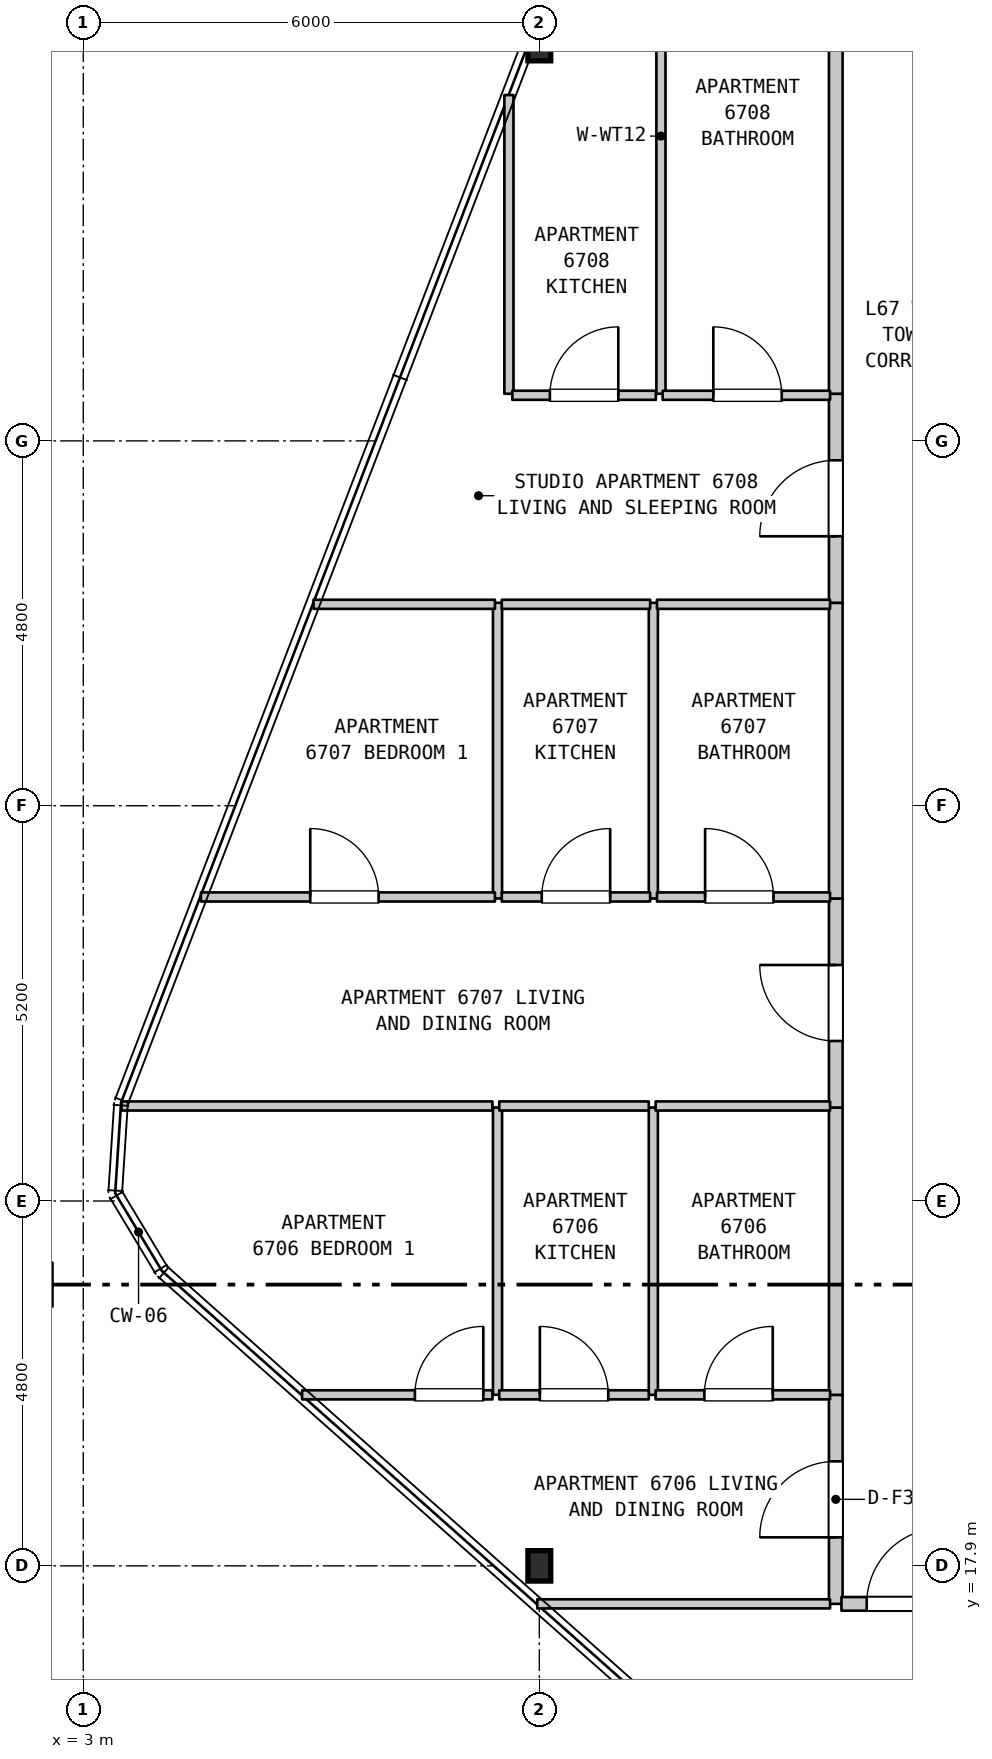
"""IFC4 building model, lengths in metres.
Left out: names, types, materials, properties, quantities, classifications, styles, units other than length and angle.
Written with IfcOpenShell. Run it as: python <this file> out.ifc"""

import sys

from ifc_helpers import new_model, si_unit, direction, frame, frame_2d, origin, origin_2d, place, context, subcontext, project, spatial, rectangle, i_section, extrude, element, fill, save


model = new_model("IFC4")
c1 = context("Model", 3, precision=1e-05, world=origin(), true_north=direction((0.0, 1.0)))
c2 = subcontext(c1, "Body", "Model", "MODEL_VIEW")
j1 = project(units=[si_unit("LENGTHUNIT", "METRE"), si_unit("PLANEANGLEUNIT", "RADIAN")], contexts=[c1])
p1 = place(None, origin())
s1 = spatial("IfcSite", under=j1, at=p1, CompositionType="ELEMENT")
p2 = place(p1, origin())
s2 = spatial("IfcBuilding", under=s1, at=p2, CompositionType="ELEMENT")
p3 = place(p2, frame((0.0, 0.0, 269.5)))
s3 = spatial("IfcBuildingStorey", under=s2, at=p3, CompositionType="ELEMENT", Elevation=269.5)
for number, where, z_axis, x_axis in (
    (1, (9.0, 17.9, 0.0), (0.0, 0.0, 1.0), (1.0, 0.0, 0.0)),
    (2, (9.0, 37.9, 0.0), (0.0, 0.0, 1.0), (1.0, 0.0, 0.0)),
):
    element("IfcColumn", number, at=place(p3, frame(where, z_axis=z_axis, x_axis=x_axis)), inside=s3, PredefinedType="COLUMN", context=c2, shape_type="SweptSolid", body=[
        extrude(i_section(OverallWidth=0.3, OverallDepth=0.4, WebThickness=0.013, FlangeThickness=0.024, FilletRadius=0.027, at=origin_2d()), origin(), (0.0, 0.0, 1.0), 3.7),
    ])
p4 = place(p3, frame((8.45, 20.15, 0.0), z_axis=(0.0, 0.0, 1.0), x_axis=(0.0, 1.0, 0.0)))
e3 = element("IfcWall", 3, at=p4, inside=s3, PredefinedType="PARTITIONING", context=c2, shape_type="SweptSolid", body=[
    extrude(rectangle(XDim=3.78, YDim=0.12, at=frame_2d((1.89, 0.0))), origin(), (0.0, 0.0, 1.0), 3.39),
])
p5 = place(p3, frame((8.45, 26.68, 0.0), z_axis=(0.0, 0.0, 1.0), x_axis=(0.0, 1.0, 0.0)))
e4 = element("IfcWall", 4, at=p5, inside=s3, PredefinedType="PARTITIONING", context=c2, shape_type="SweptSolid", body=[
    extrude(rectangle(XDim=3.89, YDim=0.12, at=frame_2d((1.945, 0.0))), origin(), (0.0, 0.0, 1.0), 3.39),
])
p6 = place(p3, frame((8.6, 33.32, 0.0), z_axis=(0.0, 0.0, 1.0), x_axis=(0.0, 1.0, 0.0)))
e5 = element("IfcWall", 5, at=p6, inside=s3, PredefinedType="PARTITIONING", context=c2, shape_type="SweptSolid", body=[
    extrude(rectangle(XDim=3.93, YDim=0.12, at=frame_2d((1.965, 0.0))), origin(), (0.0, 0.0, 1.0), 3.39),
])
p7 = place(p3, frame((10.5, 20.15, 0.0), z_axis=(0.0, 0.0, 1.0), x_axis=(0.0, 1.0, 0.0)))
e6 = element("IfcWall", 6, at=p7, inside=s3, PredefinedType="PARTITIONING", context=c2, shape_type="SweptSolid", body=[
    extrude(rectangle(XDim=3.78, YDim=0.12, at=frame_2d((1.89, 0.0))), origin(), (0.0, 0.0, 1.0), 3.39),
])
p8 = place(p3, frame((10.5, 26.68, 0.0), z_axis=(0.0, 0.0, 1.0), x_axis=(0.0, 1.0, 0.0)))
e7 = element("IfcWall", 7, at=p8, inside=s3, PredefinedType="PARTITIONING", context=c2, shape_type="SweptSolid", body=[
    extrude(rectangle(XDim=3.89, YDim=0.12, at=frame_2d((1.945, 0.0))), origin(), (0.0, 0.0, 1.0), 3.39),
])
p9 = place(p3, frame((10.6, 33.32, 0.0), z_axis=(0.0, 0.0, 1.0), x_axis=(0.0, 1.0, 0.0)))
e8 = element("IfcWall", 8, at=p9, inside=s3, PredefinedType="PARTITIONING", context=c2, shape_type="SweptSolid", body=[
    extrude(rectangle(XDim=6.78, YDim=0.12, at=frame_2d((3.39, 0.0))), origin(), (0.0, 0.0, 1.0), 3.39),
])
p10 = place(p3, frame((12.9, 17.4, 0.0), z_axis=(0.0, 0.0, 1.0), x_axis=(0.0, 1.0, 0.0)))
e9 = element("IfcWall", 9, at=p10, inside=s3, PredefinedType="STANDARD", context=c2, shape_type="SweptSolid", body=[
    extrude(rectangle(XDim=2.75, YDim=0.18, at=frame_2d((1.375, 0.0))), origin(), (0.0, 0.0, 1.0), 3.39),
])
p11 = place(p10, frame((0.875, 0.0, 0.0)))
e10 = element("IfcOpeningElement", 10, at=p11, cuts=e9, PredefinedType="OPENING", context=c2, shape_type="SweptSolid", body=[
    extrude(rectangle(XDim=1.0, YDim=2.15, at=frame_2d((0.5, 1.075))), frame((0.0, 0.1, 0.0), z_axis=(0.0, -1.0, 0.0), x_axis=(1.0, 0.0, 0.0)), (0.0, 0.0, 1.0), 0.2),
])
p12 = place(p3, frame((12.9, 20.15, 0.0), z_axis=(0.0, 0.0, 1.0), x_axis=(0.0, 1.0, 0.0)))
e11 = element("IfcWall", 11, at=p12, inside=s3, PredefinedType="STANDARD", context=c2, shape_type="SweptSolid", body=[
    extrude(rectangle(XDim=3.78, YDim=0.18, at=frame_2d((1.89, 0.0))), origin(), (0.0, 0.0, 1.0), 3.39),
])
p13 = place(p3, frame((12.9, 23.93, 0.0), z_axis=(0.0, 0.0, 1.0), x_axis=(0.0, 1.0, 0.0)))
e12 = element("IfcWall", 12, at=p13, inside=s3, PredefinedType="STANDARD", context=c2, shape_type="SweptSolid", body=[
    extrude(rectangle(XDim=2.75, YDim=0.18, at=frame_2d((1.375, 0.0))), origin(), (0.0, 0.0, 1.0), 3.39),
])
p14 = place(p13, frame((0.875, 0.0, 0.0)))
e13 = element("IfcOpeningElement", 13, at=p14, cuts=e12, PredefinedType="OPENING", context=c2, shape_type="SweptSolid", body=[
    extrude(rectangle(XDim=1.0, YDim=2.15, at=frame_2d((0.5, 1.075))), frame((0.0, 0.1, 0.0), z_axis=(0.0, -1.0, 0.0), x_axis=(1.0, 0.0, 0.0)), (0.0, 0.0, 1.0), 0.2),
])
p15 = place(p3, frame((12.9, 26.68, 0.0), z_axis=(0.0, 0.0, 1.0), x_axis=(0.0, 1.0, 0.0)))
e14 = element("IfcWall", 14, at=p15, inside=s3, PredefinedType="STANDARD", context=c2, shape_type="SweptSolid", body=[
    extrude(rectangle(XDim=3.89, YDim=0.18, at=frame_2d((1.945, 0.0))), origin(), (0.0, 0.0, 1.0), 3.39),
])
p16 = place(p3, frame((12.9, 30.57, 0.0), z_axis=(0.0, 0.0, 1.0), x_axis=(0.0, 1.0, 0.0)))
e15 = element("IfcWall", 15, at=p16, inside=s3, PredefinedType="STANDARD", context=c2, shape_type="SweptSolid", body=[
    extrude(rectangle(XDim=2.75, YDim=0.18, at=frame_2d((1.375, 0.0))), origin(), (0.0, 0.0, 1.0), 3.39),
])
p17 = place(p16, frame((0.875, 0.0, 0.0)))
e16 = element("IfcOpeningElement", 16, at=p17, cuts=e15, PredefinedType="OPENING", context=c2, shape_type="SweptSolid", body=[
    extrude(rectangle(XDim=1.0, YDim=2.15, at=frame_2d((0.5, 1.075))), frame((0.0, 0.1, 0.0), z_axis=(0.0, -1.0, 0.0), x_axis=(1.0, 0.0, 0.0)), (0.0, 0.0, 1.0), 0.2),
])
p18 = place(p3, frame((12.9, 33.32, 0.0), z_axis=(0.0, 0.0, 1.0), x_axis=(0.0, 1.0, 0.0)))
e17 = element("IfcWall", 17, at=p18, inside=s3, PredefinedType="STANDARD", context=c2, shape_type="SweptSolid", body=[
    extrude(rectangle(XDim=6.78, YDim=0.18, at=frame_2d((3.39, 0.0))), origin(), (0.0, 0.0, 1.0), 3.39),
])
p19 = place(p3, frame((8.973, 17.4, 0.0), z_axis=(0.0, 0.0, 1.0), x_axis=(1.0, 0.0, 0.0)))
e18 = element("IfcWall", 18, at=p19, inside=s3, PredefinedType="PARTITIONING", context=c2, shape_type="SweptSolid", body=[
    extrude(rectangle(XDim=3.852, YDim=0.12, at=frame_2d((1.926, 0.0))), origin(), (0.0, 0.0, 1.0), 3.39),
])
p20 = place(p3, frame((12.975, 17.4, 0.0), z_axis=(0.0, 0.0, 1.0), x_axis=(1.0, 0.0, 0.0)))
e19 = element("IfcWall", 19, at=p20, inside=s3, PredefinedType="STANDARD", context=c2, shape_type="SweptSolid", body=[
    extrude(rectangle(XDim=3.18, YDim=0.18, at=frame_2d((1.59, 0.0))), origin(), (0.0, 0.0, 1.0), 3.39),
])
p21 = place(p20, frame((0.332, 0.0, 0.0)))
e20 = element("IfcOpeningElement", 20, at=p21, cuts=e19, PredefinedType="OPENING", context=c2, shape_type="SweptSolid", body=[
    extrude(rectangle(XDim=1.0, YDim=2.15, at=frame_2d((0.5, 1.075))), frame((0.0, 0.1, 0.0), z_axis=(0.0, -1.0, 0.0), x_axis=(1.0, 0.0, 0.0)), (0.0, 0.0, 1.0), 0.2),
])
p22 = place(p3, frame((5.879, 20.15, 0.0), z_axis=(0.0, 0.0, 1.0), x_axis=(1.0, 0.0, 0.0)))
e21 = element("IfcWall", 21, at=p22, inside=s3, PredefinedType="PARTITIONING", context=c2, shape_type="SweptSolid", body=[
    extrude(rectangle(XDim=2.504, YDim=0.12, at=frame_2d((1.252, 0.0))), origin(), (0.0, 0.0, 1.0), 3.39),
])
p23 = place(p22, frame((1.484, 0.0, 0.0)))
e22 = element("IfcOpeningElement", 22, at=p23, cuts=e21, PredefinedType="OPENING", context=c2, shape_type="SweptSolid", body=[
    extrude(rectangle(XDim=0.9, YDim=2.15, at=frame_2d((0.45, 1.075))), frame((0.0, 0.07, 0.0), z_axis=(0.0, -1.0, 0.0), x_axis=(1.0, 0.0, 0.0)), (0.0, 0.0, 1.0), 0.14),
])
p24 = place(p3, frame((8.473, 20.15, 0.0), z_axis=(0.0, 0.0, 1.0), x_axis=(1.0, 0.0, 0.0)))
e23 = element("IfcWall", 23, at=p24, inside=s3, PredefinedType="PARTITIONING", context=c2, shape_type="SweptSolid", body=[
    extrude(rectangle(XDim=1.967, YDim=0.12, at=frame_2d((0.983, 0.0))), origin(), (0.0, 0.0, 1.0), 3.39),
])
p25 = place(p24, frame((0.534, 0.0, 0.0)))
e24 = element("IfcOpeningElement", 24, at=p25, cuts=e23, PredefinedType="OPENING", context=c2, shape_type="SweptSolid", body=[
    extrude(rectangle(XDim=0.9, YDim=2.15, at=frame_2d((0.45, 1.075))), frame((0.0, 0.07, 0.0), z_axis=(0.0, -1.0, 0.0), x_axis=(1.0, 0.0, 0.0)), (0.0, 0.0, 1.0), 0.14),
])
p26 = place(p3, frame((10.53, 20.15, 0.0), z_axis=(0.0, 0.0, 1.0), x_axis=(1.0, 0.0, 0.0)))
e25 = element("IfcWall", 25, at=p26, inside=s3, PredefinedType="PARTITIONING", context=c2, shape_type="SweptSolid", body=[
    extrude(rectangle(XDim=2.295, YDim=0.12, at=frame_2d((1.147, 0.0))), origin(), (0.0, 0.0, 1.0), 3.39),
])
p27 = place(p26, frame((0.641, 0.0, 0.0)))
e26 = element("IfcOpeningElement", 26, at=p27, cuts=e25, PredefinedType="OPENING", context=c2, shape_type="SweptSolid", body=[
    extrude(rectangle(XDim=0.9, YDim=2.1, at=frame_2d((0.45, 1.05))), frame((0.0, 0.07, 0.0), z_axis=(0.0, -1.0, 0.0), x_axis=(1.0, 0.0, 0.0)), (0.0, 0.0, 1.0), 0.14),
])
p28 = place(p3, frame((3.504, 23.95, 0.0), z_axis=(0.0, 0.0, 1.0), x_axis=(1.0, 0.0, 0.0)))
e27 = element("IfcWall", 27, at=p28, inside=s3, PredefinedType="PARTITIONING", context=c2, shape_type="SweptSolid", body=[
    extrude(rectangle(XDim=4.879, YDim=0.12, at=frame_2d((2.439, 0.0))), origin(), (0.0, 0.0, 1.0), 3.39),
])
p29 = place(p3, frame((8.473, 23.95, 0.0), z_axis=(0.0, 0.0, 1.0), x_axis=(1.0, 0.0, 0.0)))
e28 = element("IfcWall", 28, at=p29, inside=s3, PredefinedType="PARTITIONING", context=c2, shape_type="SweptSolid", body=[
    extrude(rectangle(XDim=1.967, YDim=0.12, at=frame_2d((0.983, 0.0))), origin(), (0.0, 0.0, 1.0), 3.39),
])
p30 = place(p3, frame((10.53, 23.95, 0.0), z_axis=(0.0, 0.0, 1.0), x_axis=(1.0, 0.0, 0.0)))
e29 = element("IfcWall", 29, at=p30, inside=s3, PredefinedType="PARTITIONING", context=c2, shape_type="SweptSolid", body=[
    extrude(rectangle(XDim=2.295, YDim=0.12, at=frame_2d((1.147, 0.0))), origin(), (0.0, 0.0, 1.0), 3.39),
])
p31 = place(p3, frame((4.548, 26.7, 0.0), z_axis=(0.0, 0.0, 1.0), x_axis=(1.0, 0.0, 0.0)))
e30 = element("IfcWall", 30, at=p31, inside=s3, PredefinedType="PARTITIONING", context=c2, shape_type="SweptSolid", body=[
    extrude(rectangle(XDim=3.868, YDim=0.12, at=frame_2d((1.934, 0.0))), origin(), (0.0, 0.0, 1.0), 3.39),
])
p32 = place(p31, frame((1.438, 0.0, 0.0)))
e31 = element("IfcOpeningElement", 31, at=p32, cuts=e30, PredefinedType="OPENING", context=c2, shape_type="SweptSolid", body=[
    extrude(rectangle(XDim=0.9, YDim=2.15, at=frame_2d((0.45, 1.075))), frame((0.0, 0.07, 0.0), z_axis=(0.0, -1.0, 0.0), x_axis=(1.0, 0.0, 0.0)), (0.0, 0.0, 1.0), 0.14),
])
p33 = place(p3, frame((8.506, 26.7, 0.0), z_axis=(0.0, 0.0, 1.0), x_axis=(1.0, 0.0, 0.0)))
e32 = element("IfcWall", 32, at=p33, inside=s3, PredefinedType="PARTITIONING", context=c2, shape_type="SweptSolid", body=[
    extrude(rectangle(XDim=1.952, YDim=0.12, at=frame_2d((0.976, 0.0))), origin(), (0.0, 0.0, 1.0), 3.39),
])
p34 = place(p33, frame((0.526, 0.0, 0.0)))
e33 = element("IfcOpeningElement", 33, at=p34, cuts=e32, PredefinedType="OPENING", context=c2, shape_type="SweptSolid", body=[
    extrude(rectangle(XDim=0.9, YDim=2.15, at=frame_2d((0.45, 1.075))), frame((0.0, 0.07, 0.0), z_axis=(0.0, -1.0, 0.0), x_axis=(1.0, 0.0, 0.0)), (0.0, 0.0, 1.0), 0.14),
])
p35 = place(p3, frame((10.548, 26.7, 0.0), z_axis=(0.0, 0.0, 1.0), x_axis=(1.0, 0.0, 0.0)))
e34 = element("IfcWall", 34, at=p35, inside=s3, PredefinedType="PARTITIONING", context=c2, shape_type="SweptSolid", body=[
    extrude(rectangle(XDim=2.277, YDim=0.12, at=frame_2d((1.138, 0.0))), origin(), (0.0, 0.0, 1.0), 3.39),
])
p36 = place(p35, frame((0.633, 0.0, 0.0)))
e35 = element("IfcOpeningElement", 35, at=p36, cuts=e34, PredefinedType="OPENING", context=c2, shape_type="SweptSolid", body=[
    extrude(rectangle(XDim=0.9, YDim=2.1, at=frame_2d((0.45, 1.05))), frame((0.0, 0.07, 0.0), z_axis=(0.0, -1.0, 0.0), x_axis=(1.0, 0.0, 0.0)), (0.0, 0.0, 1.0), 0.14),
])
p37 = place(p3, frame((6.029, 30.55, 0.0), z_axis=(0.0, 0.0, 1.0), x_axis=(1.0, 0.0, 0.0)))
e36 = element("IfcWall", 36, at=p37, inside=s3, PredefinedType="PARTITIONING", context=c2, shape_type="SweptSolid", body=[
    extrude(rectangle(XDim=2.387, YDim=0.12, at=frame_2d((1.193, 0.0))), origin(), (0.0, 0.0, 1.0), 3.39),
])
p38 = place(p3, frame((8.506, 30.55, 0.0), z_axis=(0.0, 0.0, 1.0), x_axis=(1.0, 0.0, 0.0)))
e37 = element("IfcWall", 37, at=p38, inside=s3, PredefinedType="PARTITIONING", context=c2, shape_type="SweptSolid", body=[
    extrude(rectangle(XDim=1.952, YDim=0.12, at=frame_2d((0.976, 0.0))), origin(), (0.0, 0.0, 1.0), 3.39),
])
p39 = place(p3, frame((10.548, 30.55, 0.0), z_axis=(0.0, 0.0, 1.0), x_axis=(1.0, 0.0, 0.0)))
e38 = element("IfcWall", 38, at=p39, inside=s3, PredefinedType="PARTITIONING", context=c2, shape_type="SweptSolid", body=[
    extrude(rectangle(XDim=2.277, YDim=0.12, at=frame_2d((1.138, 0.0))), origin(), (0.0, 0.0, 1.0), 3.39),
])
p40 = place(p3, frame((8.645, 33.3, 0.0), z_axis=(0.0, 0.0, 1.0), x_axis=(1.0, 0.0, 0.0)))
e39 = element("IfcWall", 39, at=p40, inside=s3, PredefinedType="PARTITIONING", context=c2, shape_type="SweptSolid", body=[
    extrude(rectangle(XDim=1.888, YDim=0.12, at=frame_2d((0.944, 0.0))), origin(), (0.0, 0.0, 1.0), 3.39),
])
p41 = place(p40, frame((0.494, 0.0, 0.0)))
e40 = element("IfcOpeningElement", 40, at=p41, cuts=e39, PredefinedType="OPENING", context=c2, shape_type="SweptSolid", body=[
    extrude(rectangle(XDim=0.9, YDim=2.15, at=frame_2d((0.45, 1.075))), frame((0.0, 0.07, 0.0), z_axis=(0.0, -1.0, 0.0), x_axis=(1.0, 0.0, 0.0)), (0.0, 0.0, 1.0), 0.14),
])
p42 = place(p3, frame((10.623, 33.3, 0.0), z_axis=(0.0, 0.0, 1.0), x_axis=(1.0, 0.0, 0.0)))
e41 = element("IfcWall", 41, at=p42, inside=s3, PredefinedType="PARTITIONING", context=c2, shape_type="SweptSolid", body=[
    extrude(rectangle(XDim=2.202, YDim=0.12, at=frame_2d((1.101, 0.0))), origin(), (0.0, 0.0, 1.0), 3.39),
])
p43 = place(p42, frame((0.666, 0.0, 0.0)))
e42 = element("IfcOpeningElement", 42, at=p43, cuts=e41, PredefinedType="OPENING", context=c2, shape_type="SweptSolid", body=[
    extrude(rectangle(XDim=0.9, YDim=2.1, at=frame_2d((0.45, 1.05))), frame((0.0, 0.07, 0.0), z_axis=(0.0, -1.0, 0.0), x_axis=(1.0, 0.0, 0.0)), (0.0, 0.0, 1.0), 0.14),
])
p44 = place(p11, origin())
e43 = element("IfcDoor", 43, at=p44, inside=s3, OperationType="SINGLE_SWING_LEFT", PredefinedType="DOOR", context=c2, shape_type="SweptSolid", body=[
    extrude(rectangle(XDim=1.0, YDim=2.15, at=frame_2d((0.5, 1.075))), frame((0.0, 0.025, 0.0), z_axis=(0.0, -1.0, 0.0), x_axis=(1.0, 0.0, 0.0)), (0.0, 0.0, 1.0), 0.05),
])
fill(e10, e43)
p45 = place(p14, origin())
e44 = element("IfcDoor", 44, at=p45, inside=s3, OperationType="SINGLE_SWING_RIGHT", PredefinedType="DOOR", context=c2, shape_type="SweptSolid", body=[
    extrude(rectangle(XDim=1.0, YDim=2.15, at=frame_2d((0.5, 1.075))), frame((0.0, 0.025, 0.0), z_axis=(0.0, -1.0, 0.0), x_axis=(1.0, 0.0, 0.0)), (0.0, 0.0, 1.0), 0.05),
])
fill(e13, e44)
p46 = place(p17, origin())
e45 = element("IfcDoor", 45, at=p46, inside=s3, OperationType="SINGLE_SWING_LEFT", PredefinedType="DOOR", context=c2, shape_type="SweptSolid", body=[
    extrude(rectangle(XDim=1.0, YDim=2.15, at=frame_2d((0.5, 1.075))), frame((0.0, 0.025, 0.0), z_axis=(0.0, -1.0, 0.0), x_axis=(1.0, 0.0, 0.0)), (0.0, 0.0, 1.0), 0.05),
])
fill(e16, e45)
p47 = place(p21, origin())
e46 = element("IfcDoor", 46, at=p47, inside=s3, OperationType="SINGLE_SWING_RIGHT", PredefinedType="DOOR", context=c2, shape_type="SweptSolid", body=[
    extrude(rectangle(XDim=1.0, YDim=2.15, at=frame_2d((0.5, 1.075))), frame((0.0, 0.025, 0.0), z_axis=(0.0, -1.0, 0.0), x_axis=(1.0, 0.0, 0.0)), (0.0, 0.0, 1.0), 0.05),
])
fill(e20, e46)
p48 = place(p23, origin())
e47 = element("IfcDoor", 47, at=p48, inside=s3, OperationType="SINGLE_SWING_RIGHT", PredefinedType="DOOR", context=c2, shape_type="SweptSolid", body=[
    extrude(rectangle(XDim=0.9, YDim=2.15, at=frame_2d((0.45, 1.075))), frame((0.0, 0.025, 0.0), z_axis=(0.0, -1.0, 0.0), x_axis=(1.0, 0.0, 0.0)), (0.0, 0.0, 1.0), 0.05),
])
fill(e22, e47)
p49 = place(p25, origin())
e48 = element("IfcDoor", 48, at=p49, inside=s3, OperationType="SINGLE_SWING_LEFT", PredefinedType="DOOR", context=c2, shape_type="SweptSolid", body=[
    extrude(rectangle(XDim=0.9, YDim=2.15, at=frame_2d((0.45, 1.075))), frame((0.0, 0.025, 0.0), z_axis=(0.0, -1.0, 0.0), x_axis=(1.0, 0.0, 0.0)), (0.0, 0.0, 1.0), 0.05),
])
fill(e24, e48)
p50 = place(p27, origin())
e49 = element("IfcDoor", 49, at=p50, inside=s3, OperationType="SINGLE_SWING_RIGHT", PredefinedType="DOOR", context=c2, shape_type="SweptSolid", body=[
    extrude(rectangle(XDim=0.9, YDim=2.1, at=frame_2d((0.45, 1.05))), frame((0.0, 0.025, 0.0), z_axis=(0.0, -1.0, 0.0), x_axis=(1.0, 0.0, 0.0)), (0.0, 0.0, 1.0), 0.05),
])
fill(e26, e49)
p51 = place(p32, origin())
e50 = element("IfcDoor", 50, at=p51, inside=s3, OperationType="SINGLE_SWING_LEFT", PredefinedType="DOOR", context=c2, shape_type="SweptSolid", body=[
    extrude(rectangle(XDim=0.9, YDim=2.15, at=frame_2d((0.45, 1.075))), frame((0.0, 0.025, 0.0), z_axis=(0.0, -1.0, 0.0), x_axis=(1.0, 0.0, 0.0)), (0.0, 0.0, 1.0), 0.05),
])
fill(e31, e50)
p52 = place(p34, origin())
e51 = element("IfcDoor", 51, at=p52, inside=s3, OperationType="SINGLE_SWING_RIGHT", PredefinedType="DOOR", context=c2, shape_type="SweptSolid", body=[
    extrude(rectangle(XDim=0.9, YDim=2.15, at=frame_2d((0.45, 1.075))), frame((0.0, 0.025, 0.0), z_axis=(0.0, -1.0, 0.0), x_axis=(1.0, 0.0, 0.0)), (0.0, 0.0, 1.0), 0.05),
])
fill(e33, e51)
p53 = place(p36, origin())
e52 = element("IfcDoor", 52, at=p53, inside=s3, OperationType="SINGLE_SWING_LEFT", PredefinedType="DOOR", context=c2, shape_type="SweptSolid", body=[
    extrude(rectangle(XDim=0.9, YDim=2.1, at=frame_2d((0.45, 1.05))), frame((0.0, 0.025, 0.0), z_axis=(0.0, -1.0, 0.0), x_axis=(1.0, 0.0, 0.0)), (0.0, 0.0, 1.0), 0.05),
])
fill(e35, e52)
p54 = place(p41, origin())
e53 = element("IfcDoor", 53, at=p54, inside=s3, OperationType="SINGLE_SWING_RIGHT", PredefinedType="DOOR", context=c2, shape_type="SweptSolid", body=[
    extrude(rectangle(XDim=0.9, YDim=2.15, at=frame_2d((0.45, 1.075))), frame((0.0, 0.025, 0.0), z_axis=(0.0, -1.0, 0.0), x_axis=(1.0, 0.0, 0.0)), (0.0, 0.0, 1.0), 0.05),
])
fill(e40, e53)
p55 = place(p43, origin())
e54 = element("IfcDoor", 54, at=p55, inside=s3, OperationType="SINGLE_SWING_LEFT", PredefinedType="DOOR", context=c2, shape_type="SweptSolid", body=[
    extrude(rectangle(XDim=0.9, YDim=2.1, at=frame_2d((0.45, 1.05))), frame((0.0, 0.025, 0.0), z_axis=(0.0, -1.0, 0.0), x_axis=(1.0, 0.0, 0.0)), (0.0, 0.0, 1.0), 0.05),
])
fill(e42, e54)
save(model, sys.argv[1])
